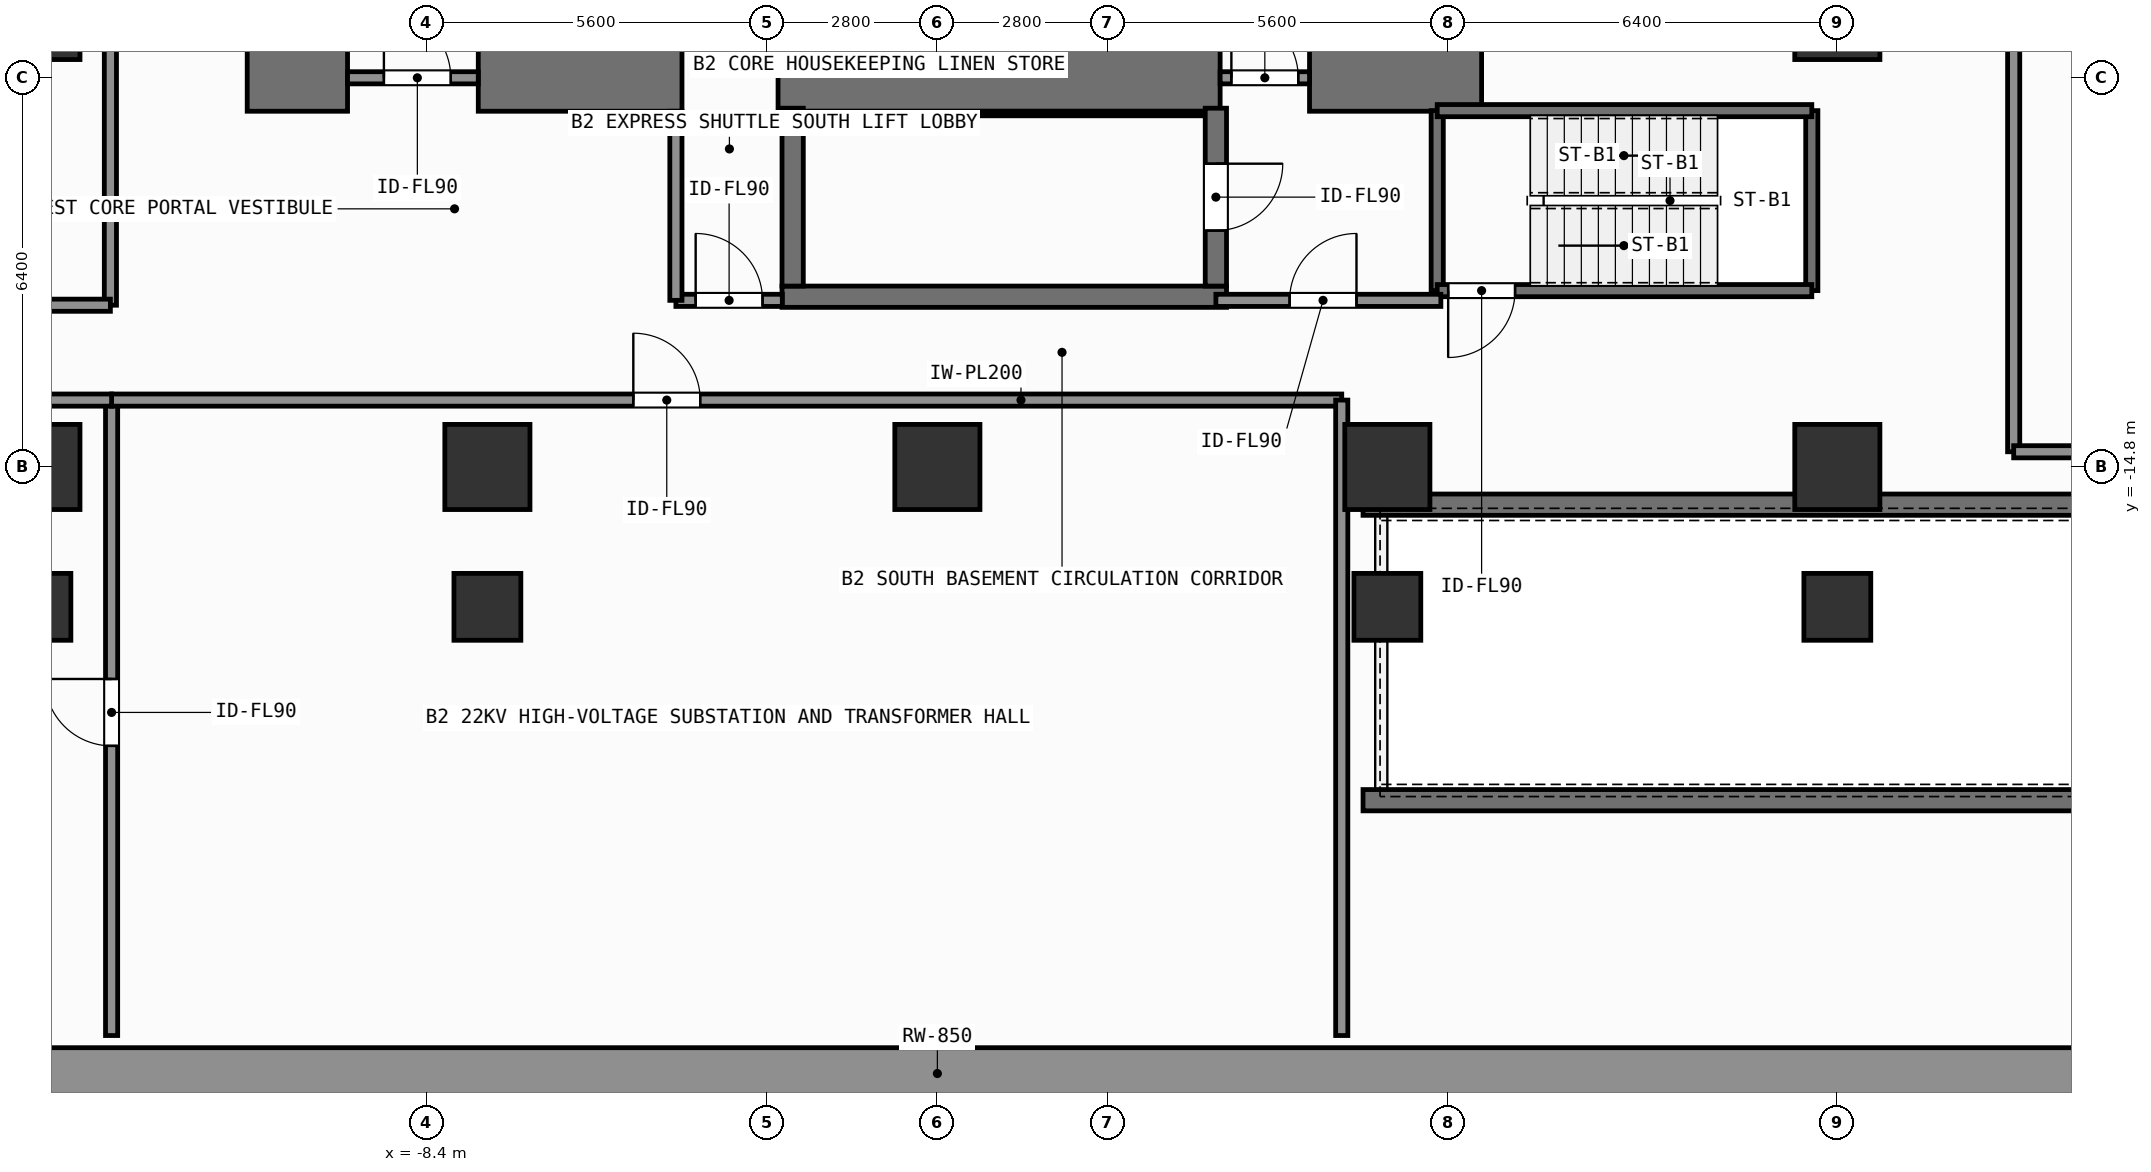
"""IFC4 building model, lengths in metres.
Left out: names, types, materials, properties, quantities, classifications, styles, units other than length and angle.
Written with IfcOpenShell. Run it as: python <this file> out.ifc"""

import sys

from ifc_helpers import new_model, si_unit, direction, frame, frame_2d, origin, origin_2d, place, context, subcontext, project, spatial, rectangle, extrude, element, fill, save


model = new_model("IFC4")
c1 = context("Model", 3, precision=1e-05, world=origin(), true_north=direction((0.0, 1.0)))
c2 = subcontext(c1, "Body", "Model", "MODEL_VIEW")
j1 = project(units=[si_unit("LENGTHUNIT", "METRE"), si_unit("PLANEANGLEUNIT", "RADIAN")], contexts=[c1])
p1 = place(None, origin())
s1 = spatial("IfcSite", under=j1, at=p1, CompositionType="ELEMENT")
p2 = place(p1, origin())
s2 = spatial("IfcBuilding", under=s1, at=p2, CompositionType="ELEMENT")
p3 = place(p2, frame((0.0, 0.0, -8.4)))
s3 = spatial("IfcBuildingStorey", under=s2, at=p3, CompositionType="ELEMENT", Elevation=-8.4)
p4 = place(p3, frame((-33.6, -24.775, 0.0), z_axis=(0.0, 0.0, 1.0), x_axis=(1.0, 0.0, 0.0)))
e1 = element("IfcWall", 1, at=p4, inside=s3, PredefinedType="SOLIDWALL", context=c2, shape_type="SweptSolid", body=[
    extrude(rectangle(XDim=67.2, YDim=0.85, at=frame_2d((33.6, 0.0))), origin(), (0.0, 0.0, 1.0), 4.2),
])
p5 = place(p3, frame((7.0, -20.28, 0.0), z_axis=(0.0, 0.0, 1.0), x_axis=(1.0, 0.0, 0.0)))
e2 = element("IfcWall", 2, at=p5, inside=s3, PredefinedType="SHEAR", context=c2, shape_type="SweptSolid", body=[
    extrude(rectangle(XDim=25.5, YDim=0.35, at=frame_2d((12.75, 0.0))), origin(), (0.0, 0.0, 1.0), 4.2),
])
p6 = place(p3, frame((7.0, -15.42, 0.0), z_axis=(0.0, 0.0, 1.0), x_axis=(1.0, 0.0, 0.0)))
e3 = element("IfcWall", 3, at=p6, inside=s3, PredefinedType="SHEAR", context=c2, shape_type="SweptSolid", body=[
    extrude(rectangle(XDim=25.75, YDim=0.35, at=frame_2d((12.875, 0.0))), origin(), (0.0, 0.0, 1.0), 4.2),
])
p7 = place(p3, frame((-11.35, -8.4, 0.0), z_axis=(0.0, 0.0, 1.0), x_axis=(1.0, 0.0, 0.0)))
e4 = element("IfcWall", 4, at=p7, inside=s3, PredefinedType="SHEAR", context=c2, shape_type="SweptSolid", body=[
    extrude(rectangle(XDim=1.65, YDim=1.1, at=frame_2d((0.825, 0.0))), origin(), (0.0, 0.0, 1.0), 4.2),
])
p8 = place(p3, frame((-7.55, -8.4, 0.0), z_axis=(0.0, 0.0, 1.0), x_axis=(1.0, 0.0, 0.0)))
e5 = element("IfcWall", 5, at=p8, inside=s3, PredefinedType="SHEAR", context=c2, shape_type="SweptSolid", body=[
    extrude(rectangle(XDim=3.35, YDim=1.1, at=frame_2d((1.675, 0.0))), origin(), (0.0, 0.0, 1.0), 4.2),
])
p9 = place(p3, frame((-2.62, -8.4, 0.0), z_axis=(0.0, 0.0, 1.0), x_axis=(1.0, 0.0, 0.0)))
e6 = element("IfcWall", 6, at=p9, inside=s3, PredefinedType="SHEAR", context=c2, shape_type="SweptSolid", body=[
    extrude(rectangle(XDim=7.27, YDim=1.1, at=frame_2d((3.635, 0.0))), origin(), (0.0, 0.0, 1.0), 4.2),
])
p10 = place(p3, frame((6.12, -8.4, 0.0), z_axis=(0.0, 0.0, 1.0), x_axis=(1.0, 0.0, 0.0)))
e7 = element("IfcWall", 7, at=p10, inside=s3, PredefinedType="SHEAR", context=c2, shape_type="SweptSolid", body=[
    extrude(rectangle(XDim=2.83, YDim=1.1, at=frame_2d((1.415, 0.0))), origin(), (0.0, 0.0, 1.0), 4.2),
])
p11 = place(p3, frame((-2.555, -12.0, 0.0), z_axis=(0.0, 0.0, 1.0), x_axis=(1.0, 0.0, 0.0)))
e8 = element("IfcWall", 8, at=p11, inside=s3, PredefinedType="SHEAR", context=c2, shape_type="SweptSolid", body=[
    extrude(rectangle(XDim=7.31, YDim=0.35, at=frame_2d((3.655, 0.0))), origin(), (0.0, 0.0, 1.0), 4.2),
])
p12 = place(p3, frame((-2.2, -8.988, 0.0), z_axis=(0.0, 0.0, 1.0), x_axis=(1.0, 0.0, 0.0)))
e9 = element("IfcWall", 9, at=p12, inside=s3, PredefinedType="SHEAR", context=c2, shape_type="SweptSolid", body=[
    extrude(rectangle(XDim=6.6, YDim=0.075, at=frame_2d((3.3, 0.0))), origin(), (0.0, 0.0, 1.0), 4.2),
])
p13 = place(p3, frame((-2.38, -11.825, 0.0), z_axis=(0.0, 0.0, 1.0), x_axis=(0.0, 1.0, 0.0)))
e10 = element("IfcWall", 10, at=p13, inside=s3, PredefinedType="SHEAR", context=c2, shape_type="SweptSolid", body=[
    extrude(rectangle(XDim=2.925, YDim=0.35, at=frame_2d((1.462, 0.0))), origin(), (0.0, 0.0, 1.0), 4.2),
])
p14 = place(p3, frame((4.58, -8.9, 0.0), z_axis=(0.0, 0.0, 1.0), x_axis=(0.0, -1.0, 0.0)))
e11 = element("IfcWall", 11, at=p14, inside=s3, PredefinedType="SHEAR", context=c2, shape_type="SweptSolid", body=[
    extrude(rectangle(XDim=2.925, YDim=0.35, at=frame_2d((1.462, 0.0))), origin(), (0.0, 0.0, 1.0), 4.2),
])
p15 = place(p14, frame((0.913, 0.0, 0.0)))
e12 = element("IfcOpeningElement", 12, at=p15, cuts=e11, PredefinedType="OPENING", context=c2, shape_type="SweptSolid", body=[
    extrude(rectangle(XDim=1.1, YDim=2.15, at=frame_2d((0.55, 1.075))), frame((0.0, 0.185, 0.0), z_axis=(0.0, -1.0, 0.0), x_axis=(1.0, 0.0, 0.0)), (0.0, 0.0, 1.0), 0.37),
])
for number, where, z_axis, x_axis in (
    (13, (-14.8, -14.8, 0.0), (0.0, 0.0, 1.0), (1.0, 0.0, 0.0)),
    (14, (-7.4, -14.8, 0.0), (0.0, 0.0, 1.0), (1.0, 0.0, 0.0)),
    (15, (0.0, -14.8, 0.0), (0.0, 0.0, 1.0), (1.0, 0.0, 0.0)),
    (16, (7.4, -14.8, 0.0), (0.0, 0.0, 1.0), (1.0, 0.0, 0.0)),
    (17, (14.8, -14.8, 0.0), (0.0, 0.0, 1.0), (1.0, 0.0, 0.0)),
    (18, (-14.8, -7.4, 0.0), (0.0, 0.0, 1.0), (1.0, 0.0, 0.0)),
    (19, (14.8, -7.4, 0.0), (0.0, 0.0, 1.0), (1.0, 0.0, 0.0)),
):
    element("IfcColumn", number, at=place(p3, frame(where, z_axis=z_axis, x_axis=x_axis)), inside=s3, PredefinedType="COLUMN", context=c2, shape_type="SweptSolid", body=[
        extrude(rectangle(XDim=1.4, YDim=1.4, at=origin_2d()), origin(), (0.0, 0.0, 1.0), 4.2),
    ])
for number, where, z_axis, x_axis in (
    (20, (-14.8, -17.1, 0.0), (0.0, 0.0, 1.0), (1.0, 0.0, 0.0)),
    (21, (-7.4, -17.1, 0.0), (0.0, 0.0, 1.0), (1.0, 0.0, 0.0)),
    (22, (7.4, -17.1, 0.0), (0.0, 0.0, 1.0), (1.0, 0.0, 0.0)),
    (23, (14.8, -17.1, 0.0), (0.0, 0.0, 1.0), (1.0, 0.0, 0.0)),
):
    element("IfcColumn", number, at=place(p3, frame(where, z_axis=z_axis, x_axis=x_axis)), inside=s3, PredefinedType="COLUMN", context=c2, shape_type="SweptSolid", body=[
        extrude(rectangle(XDim=1.1, YDim=1.1, at=origin_2d()), origin(), (0.0, 0.0, 1.0), 4.2),
    ])
for number, where, z_axis, x_axis in (
    (24, (8.22, -11.9, 0.0), (0.0, 0.0, 1.0), (0.0, 1.0, 0.0)),
    (25, (14.38, -8.94, 0.0), (0.0, 0.0, 1.0), (0.0, -1.0, 0.0)),
):
    element("IfcWall", number, at=place(p3, frame(where, z_axis=z_axis, x_axis=x_axis)), inside=s3, PredefinedType="SHEAR", context=c2, shape_type="SweptSolid", body=[
        extrude(rectangle(XDim=2.96, YDim=0.2, at=frame_2d((1.48, 0.0))), origin(), (0.0, 0.0, 1.0), 3.94),
    ])
p16 = place(p3, frame((14.38, -11.9, 0.0), z_axis=(0.0, 0.0, 1.0), x_axis=(-1.0, 0.0, 0.0)))
e26 = element("IfcWall", 26, at=p16, inside=s3, PredefinedType="SHEAR", context=c2, shape_type="SweptSolid", body=[
    extrude(rectangle(XDim=6.16, YDim=0.2, at=frame_2d((3.08, 0.0))), origin(), (0.0, 0.0, 1.0), 3.94),
])
p17 = place(p16, frame((4.88, 0.0, 0.0)))
e27 = element("IfcOpeningElement", 27, at=p17, cuts=e26, PredefinedType="OPENING", context=c2, shape_type="SweptSolid", body=[
    extrude(rectangle(XDim=1.1, YDim=2.15, at=frame_2d((0.55, 1.075))), frame((0.0, 0.11, 0.0), z_axis=(0.0, -1.0, 0.0), x_axis=(1.0, 0.0, 0.0)), (0.0, 0.0, 1.0), 0.22),
])
p18 = place(p3, frame((8.22, -8.94, 0.0), z_axis=(0.0, 0.0, 1.0), x_axis=(1.0, 0.0, 0.0)))
e28 = element("IfcWall", 28, at=p18, inside=s3, PredefinedType="SHEAR", context=c2, shape_type="SweptSolid", body=[
    extrude(rectangle(XDim=6.16, YDim=0.2, at=frame_2d((3.08, 0.0))), origin(), (0.0, 0.0, 1.0), 3.94),
])
p19 = place(p3, frame((4.58, -12.06, 0.0), z_axis=(0.0, 0.0, 1.0), x_axis=(1.0, 0.0, 0.0)))
e29 = element("IfcWall", 29, at=p19, inside=s3, PredefinedType="SOLIDWALL", context=c2, shape_type="SweptSolid", body=[
    extrude(rectangle(XDim=3.7, YDim=0.2, at=frame_2d((1.85, 0.0))), origin(), (0.0, 0.0, 1.0), 3.94),
])
p20 = place(p19, frame((1.212, 0.0, 0.0)))
e30 = element("IfcOpeningElement", 30, at=p20, cuts=e29, PredefinedType="OPENING", context=c2, shape_type="SweptSolid", body=[
    extrude(rectangle(XDim=1.1, YDim=2.15, at=frame_2d((0.55, 1.075))), frame((0.0, 0.11, 0.0), z_axis=(0.0, -1.0, 0.0), x_axis=(1.0, 0.0, 0.0)), (0.0, 0.0, 1.0), 0.22),
])
p21 = place(p3, frame((4.65, -8.4, 0.0), z_axis=(0.0, 0.0, 1.0), x_axis=(1.0, 0.0, 0.0)))
e31 = element("IfcWall", 31, at=p21, inside=s3, PredefinedType="SOLIDWALL", context=c2, shape_type="SweptSolid", body=[
    extrude(rectangle(XDim=1.47, YDim=0.2, at=frame_2d((0.735, 0.0))), origin(), (0.0, 0.0, 1.0), 2.98),
])
p22 = place(p21, frame((0.185, 0.0, 0.0)))
e32 = element("IfcOpeningElement", 32, at=p22, cuts=e31, PredefinedType="OPENING", context=c2, shape_type="SweptSolid", body=[
    extrude(rectangle(XDim=1.1, YDim=2.15, at=frame_2d((0.55, 1.075))), frame((0.0, 0.11, 0.0), z_axis=(0.0, -1.0, 0.0), x_axis=(1.0, 0.0, 0.0)), (0.0, 0.0, 1.0), 0.22),
])
p23 = place(p3, frame((-9.7, -8.4, 0.0), z_axis=(0.0, 0.0, 1.0), x_axis=(1.0, 0.0, 0.0)))
e33 = element("IfcWall", 33, at=p23, inside=s3, PredefinedType="SOLIDWALL", context=c2, shape_type="SweptSolid", body=[
    extrude(rectangle(XDim=2.15, YDim=0.2, at=frame_2d((1.075, 0.0))), origin(), (0.0, 0.0, 1.0), 2.98),
])
p24 = place(p23, frame((0.598, 0.0, 0.0)))
e34 = element("IfcOpeningElement", 34, at=p24, cuts=e33, PredefinedType="OPENING", context=c2, shape_type="SweptSolid", body=[
    extrude(rectangle(XDim=1.1, YDim=2.15, at=frame_2d((0.55, 1.075))), frame((0.0, 0.11, 0.0), z_axis=(0.0, -1.0, 0.0), x_axis=(1.0, 0.0, 0.0)), (0.0, 0.0, 1.0), 0.22),
])
p25 = place(p3, frame((-4.3, -12.06, 0.0), z_axis=(0.0, 0.0, 1.0), x_axis=(1.0, 0.0, 0.0)))
e35 = element("IfcWall", 35, at=p25, inside=s3, PredefinedType="SOLIDWALL", context=c2, shape_type="SweptSolid", body=[
    extrude(rectangle(XDim=1.75, YDim=0.2, at=frame_2d((0.875, 0.0))), origin(), (0.0, 0.0, 1.0), 3.94),
])
p26 = place(p25, frame((0.325, 0.0, 0.0)))
e36 = element("IfcOpeningElement", 36, at=p26, cuts=e35, PredefinedType="OPENING", context=c2, shape_type="SweptSolid", body=[
    extrude(rectangle(XDim=1.1, YDim=2.15, at=frame_2d((0.55, 1.075))), frame((0.0, 0.11, 0.0), z_axis=(0.0, -1.0, 0.0), x_axis=(1.0, 0.0, 0.0)), (0.0, 0.0, 1.0), 0.22),
])
p27 = place(p3, frame((-13.6, -12.14, 0.0), z_axis=(0.0, 0.0, 1.0), x_axis=(0.0, 1.0, 0.0)))
e37 = element("IfcWall", 37, at=p27, inside=s3, PredefinedType="SOLIDWALL", context=c2, shape_type="SweptSolid", body=[
    extrude(rectangle(XDim=16.64, YDim=0.2, at=frame_2d((8.32, 0.0))), origin(), (0.0, 0.0, 1.0), 3.94),
])
p28 = place(p27, frame((6.964, 0.0, 0.0)))
e38 = element("IfcOpeningElement", 38, at=p28, cuts=e37, PredefinedType="OPENING", context=c2, shape_type="SweptSolid", body=[
    extrude(rectangle(XDim=1.1, YDim=2.15, at=frame_2d((0.55, 1.075))), frame((0.0, 0.11, 0.0), z_axis=(0.0, -1.0, 0.0), x_axis=(1.0, 0.0, 0.0)), (0.0, 0.0, 1.0), 0.22),
])
p29 = place(p3, frame((17.7, -14.55, 0.0), z_axis=(0.0, 0.0, 1.0), x_axis=(0.0, 1.0, 0.0)))
e39 = element("IfcWall", 39, at=p29, inside=s3, PredefinedType="SOLIDWALL", context=c2, shape_type="SweptSolid", body=[
    extrude(rectangle(XDim=28.25, YDim=0.2, at=frame_2d((14.125, 0.0))), origin(), (0.0, 0.0, 1.0), 3.94),
])
p30 = place(p29, frame((15.006, 0.0, 0.0)))
e40 = element("IfcOpeningElement", 40, at=p30, cuts=e39, PredefinedType="OPENING", context=c2, shape_type="SweptSolid", body=[
    extrude(rectangle(XDim=1.1, YDim=2.15, at=frame_2d((0.55, 1.075))), frame((0.0, 0.11, 0.0), z_axis=(0.0, -1.0, 0.0), x_axis=(1.0, 0.0, 0.0)), (0.0, 0.0, 1.0), 0.22),
])
p31 = place(p3, frame((-13.58, -24.15, 0.0), z_axis=(0.0, 0.0, 1.0), x_axis=(0.0, 1.0, 0.0)))
e41 = element("IfcWall", 41, at=p31, inside=s3, PredefinedType="SOLIDWALL", context=c2, shape_type="SweptSolid", body=[
    extrude(rectangle(XDim=10.45, YDim=0.2, at=frame_2d((5.225, 0.0))), origin(), (0.0, 0.0, 1.0), 3.94),
])
p32 = place(p31, frame((4.763, 0.0, 0.0)))
e42 = element("IfcOpeningElement", 42, at=p32, cuts=e41, PredefinedType="OPENING", context=c2, shape_type="SweptSolid", body=[
    extrude(rectangle(XDim=1.1, YDim=2.15, at=frame_2d((0.55, 1.075))), frame((0.0, 0.11, 0.0), z_axis=(0.0, -1.0, 0.0), x_axis=(1.0, 0.0, 0.0)), (0.0, 0.0, 1.0), 0.22),
])
p33 = place(p3, frame((-13.58, -13.7, 0.0), z_axis=(0.0, 0.0, 1.0), x_axis=(1.0, 0.0, 0.0)))
e43 = element("IfcWall", 43, at=p33, inside=s3, PredefinedType="SOLIDWALL", context=c2, shape_type="SweptSolid", body=[
    extrude(rectangle(XDim=20.23, YDim=0.2, at=frame_2d((10.115, 0.0))), origin(), (0.0, 0.0, 1.0), 3.94),
])
p34 = place(p33, frame((8.58, 0.0, 0.0)))
e44 = element("IfcOpeningElement", 44, at=p34, cuts=e43, PredefinedType="OPENING", context=c2, shape_type="SweptSolid", body=[
    extrude(rectangle(XDim=1.1, YDim=2.15, at=frame_2d((0.55, 1.075))), frame((0.0, 0.11, 0.0), z_axis=(0.0, -1.0, 0.0), x_axis=(1.0, 0.0, 0.0)), (0.0, 0.0, 1.0), 0.22),
])
p35 = place(p3, frame((-4.3, -12.06, 0.0), z_axis=(0.0, 0.0, 1.0), x_axis=(0.0, 1.0, 0.0)))
e45 = element("IfcWall", 45, at=p35, inside=s3, PredefinedType="SOLIDWALL", context=c2, shape_type="SweptSolid", body=[
    extrude(rectangle(XDim=3.11, YDim=0.2, at=frame_2d((1.555, 0.0))), origin(), (0.0, 0.0, 1.0), 3.94),
])
p36 = place(p3, frame((-32.65, -12.14, 0.0), z_axis=(0.0, 0.0, 1.0), x_axis=(1.0, 0.0, 0.0)))
e46 = element("IfcWall", 46, at=p36, inside=s3, PredefinedType="SOLIDWALL", context=c2, shape_type="SweptSolid", body=[
    extrude(rectangle(XDim=19.05, YDim=0.2, at=frame_2d((9.525, 0.0))), origin(), (0.0, 0.0, 1.0), 3.94),
])
p37 = place(p3, frame((17.7, -14.55, 0.0), z_axis=(0.0, 0.0, 1.0), x_axis=(1.0, 0.0, 0.0)))
e47 = element("IfcWall", 47, at=p37, inside=s3, PredefinedType="SOLIDWALL", context=c2, shape_type="SweptSolid", body=[
    extrude(rectangle(XDim=14.95, YDim=0.2, at=frame_2d((7.475, 0.0))), origin(), (0.0, 0.0, 1.0), 3.23),
])
p38 = place(p3, frame((-32.65, -13.7, 0.0), z_axis=(0.0, 0.0, 1.0), x_axis=(1.0, 0.0, 0.0)))
e48 = element("IfcWall", 48, at=p38, inside=s3, PredefinedType="SOLIDWALL", context=c2, shape_type="SweptSolid", body=[
    extrude(rectangle(XDim=19.07, YDim=0.2, at=frame_2d((9.535, 0.0))), origin(), (0.0, 0.0, 1.0), 3.94),
])
p39 = place(p3, frame((6.65, -24.15, 0.0), z_axis=(0.0, 0.0, 1.0), x_axis=(0.0, 1.0, 0.0)))
e49 = element("IfcWall", 49, at=p39, inside=s3, PredefinedType="SOLIDWALL", context=c2, shape_type="SweptSolid", body=[
    extrude(rectangle(XDim=10.45, YDim=0.2, at=frame_2d((5.225, 0.0))), origin(), (0.0, 0.0, 1.0), 3.94),
])
p40 = place(p15, origin())
e50 = element("IfcDoor", 50, at=p40, inside=s3, OperationType="SINGLE_SWING_LEFT", PredefinedType="DOOR", context=c2, shape_type="SweptSolid", body=[
    extrude(rectangle(XDim=1.1, YDim=2.15, at=frame_2d((0.55, 1.075))), frame((0.0, 0.025, 0.0), z_axis=(0.0, -1.0, 0.0), x_axis=(1.0, 0.0, 0.0)), (0.0, 0.0, 1.0), 0.05),
])
fill(e12, e50)
p41 = place(p17, origin())
e51 = element("IfcDoor", 51, at=p41, inside=s3, OperationType="SINGLE_SWING_RIGHT", PredefinedType="DOOR", context=c2, shape_type="SweptSolid", body=[
    extrude(rectangle(XDim=1.1, YDim=2.15, at=frame_2d((0.55, 1.075))), frame((0.0, 0.025, 0.0), z_axis=(0.0, -1.0, 0.0), x_axis=(1.0, 0.0, 0.0)), (0.0, 0.0, 1.0), 0.05),
])
fill(e27, e51)
p42 = place(p20, origin())
e52 = element("IfcDoor", 52, at=p42, inside=s3, OperationType="SINGLE_SWING_RIGHT", PredefinedType="DOOR", context=c2, shape_type="SweptSolid", body=[
    extrude(rectangle(XDim=1.1, YDim=2.15, at=frame_2d((0.55, 1.075))), frame((0.0, 0.025, 0.0), z_axis=(0.0, -1.0, 0.0), x_axis=(1.0, 0.0, 0.0)), (0.0, 0.0, 1.0), 0.05),
])
fill(e30, e52)
p43 = place(p22, origin())
e53 = element("IfcDoor", 53, at=p43, inside=s3, OperationType="SINGLE_SWING_LEFT", PredefinedType="DOOR", context=c2, shape_type="SweptSolid", body=[
    extrude(rectangle(XDim=1.1, YDim=2.15, at=frame_2d((0.55, 1.075))), frame((0.0, 0.025, 0.0), z_axis=(0.0, -1.0, 0.0), x_axis=(1.0, 0.0, 0.0)), (0.0, 0.0, 1.0), 0.05),
])
fill(e32, e53)
p44 = place(p24, origin())
e54 = element("IfcDoor", 54, at=p44, inside=s3, OperationType="SINGLE_SWING_LEFT", PredefinedType="DOOR", context=c2, shape_type="SweptSolid", body=[
    extrude(rectangle(XDim=1.1, YDim=2.15, at=frame_2d((0.55, 1.075))), frame((0.0, 0.025, 0.0), z_axis=(0.0, -1.0, 0.0), x_axis=(1.0, 0.0, 0.0)), (0.0, 0.0, 1.0), 0.05),
])
fill(e34, e54)
p45 = place(p26, origin())
e55 = element("IfcDoor", 55, at=p45, inside=s3, OperationType="SINGLE_SWING_LEFT", PredefinedType="DOOR", context=c2, shape_type="SweptSolid", body=[
    extrude(rectangle(XDim=1.1, YDim=2.15, at=frame_2d((0.55, 1.075))), frame((0.0, 0.025, 0.0), z_axis=(0.0, -1.0, 0.0), x_axis=(1.0, 0.0, 0.0)), (0.0, 0.0, 1.0), 0.05),
])
fill(e36, e55)
p46 = place(p32, origin())
e56 = element("IfcDoor", 56, at=p46, inside=s3, OperationType="SINGLE_SWING_RIGHT", PredefinedType="DOOR", context=c2, shape_type="SweptSolid", body=[
    extrude(rectangle(XDim=1.1, YDim=2.15, at=frame_2d((0.55, 1.075))), frame((0.0, 0.025, 0.0), z_axis=(0.0, -1.0, 0.0), x_axis=(1.0, 0.0, 0.0)), (0.0, 0.0, 1.0), 0.05),
])
fill(e42, e56)
p47 = place(p34, origin())
e57 = element("IfcDoor", 57, at=p47, inside=s3, OperationType="SINGLE_SWING_LEFT", PredefinedType="DOOR", context=c2, shape_type="SweptSolid", body=[
    extrude(rectangle(XDim=1.1, YDim=2.15, at=frame_2d((0.55, 1.075))), frame((0.0, 0.025, 0.0), z_axis=(0.0, -1.0, 0.0), x_axis=(1.0, 0.0, 0.0)), (0.0, 0.0, 1.0), 0.05),
])
fill(e44, e57)
save(model, sys.argv[1])
